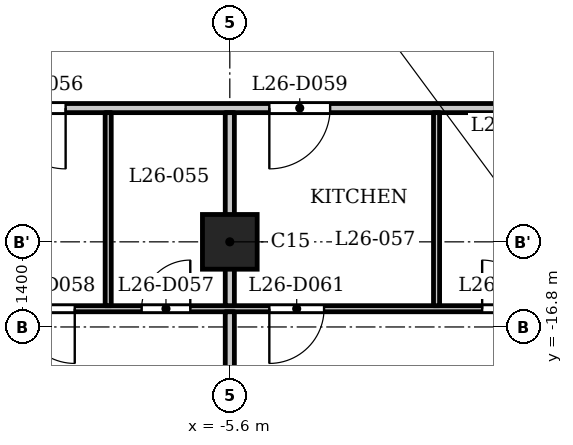
"""IFC4 building model, lengths in metres.
Left out: names, types, materials, properties, quantities, classifications, styles, units other than length and angle.
Written with IfcOpenShell. Run it as: python <this file> out.ifc"""

import sys

from ifc_helpers import new_model, si_unit, direction, frame, frame_2d, origin, origin_2d, place, context, subcontext, project, spatial, rectangle, extrude, element, fill, save


model = new_model("IFC4")
c1 = context("Model", 3, precision=1e-05, world=origin(), true_north=direction((0.0, 1.0)))
c2 = subcontext(c1, "Body", "Model", "MODEL_VIEW")
j1 = project(units=[si_unit("LENGTHUNIT", "METRE"), si_unit("PLANEANGLEUNIT", "RADIAN")], contexts=[c1])
p1 = place(None, origin())
s1 = spatial("IfcSite", under=j1, at=p1, CompositionType="ELEMENT")
p2 = place(p1, origin())
s2 = spatial("IfcBuilding", under=s1, at=p2, CompositionType="ELEMENT")
p3 = place(p2, frame((0.0, 0.0, 104.3)))
s3 = spatial("IfcBuildingStorey", under=s2, at=p3, CompositionType="ELEMENT", Elevation=104.3)
p4 = place(p3, frame((-5.6, -15.4, 0.0), z_axis=(0.0, 0.0, 1.0), x_axis=(1.0, 0.0, 0.0)))
e1 = element("IfcColumn", 1, at=p4, inside=s3, PredefinedType="COLUMN", context=c2, shape_type="SweptSolid", body=[
    extrude(rectangle(XDim=0.9, YDim=0.9, at=origin_2d()), origin(), (0.0, 0.0, 1.0), 3.5),
])
p5 = place(p3, frame((-16.725, -16.5, 0.0), z_axis=(0.0, 0.0, 1.0), x_axis=(1.0, 0.0, 0.0)))
e2 = element("IfcWall", 2, at=p5, inside=s3, PredefinedType="PARTITIONING", context=c2, shape_type="SweptSolid", body=[
    extrude(rectangle(XDim=33.45, YDim=0.1, at=frame_2d((16.725, 0.0))), origin(), (0.0, 0.0, 1.0), 3.2),
])
p6 = place(p5, frame((4.075, 0.0, 0.0)))
e3 = element("IfcOpeningElement", 3, at=p6, cuts=e2, PredefinedType="OPENING", context=c2, shape_type="SweptSolid", body=[
    extrude(rectangle(XDim=0.8, YDim=2.1, at=frame_2d((0.4, 1.05))), frame((0.0, 0.06, 0.0), z_axis=(0.0, -1.0, 0.0), x_axis=(1.0, 0.0, 0.0)), (0.0, 0.0, 1.0), 0.12),
])
p7 = place(p5, frame((1.075, 0.0, 0.0)))
e4 = element("IfcOpeningElement", 4, at=p7, cuts=e2, PredefinedType="OPENING", context=c2, shape_type="SweptSolid", body=[
    extrude(rectangle(XDim=0.9, YDim=2.1, at=frame_2d((0.45, 1.05))), frame((0.0, 0.06, 0.0), z_axis=(0.0, -1.0, 0.0), x_axis=(1.0, 0.0, 0.0)), (0.0, 0.0, 1.0), 0.12),
])
p8 = place(p5, frame((9.675, 0.0, 0.0)))
e5 = element("IfcOpeningElement", 5, at=p8, cuts=e2, PredefinedType="OPENING", context=c2, shape_type="SweptSolid", body=[
    extrude(rectangle(XDim=0.8, YDim=2.1, at=frame_2d((0.4, 1.05))), frame((0.0, 0.06, 0.0), z_axis=(0.0, -1.0, 0.0), x_axis=(1.0, 0.0, 0.0)), (0.0, 0.0, 1.0), 0.12),
])
p9 = place(p5, frame((7.675, 0.0, 0.0)))
e6 = element("IfcOpeningElement", 6, at=p9, cuts=e2, PredefinedType="OPENING", context=c2, shape_type="SweptSolid", body=[
    extrude(rectangle(XDim=0.9, YDim=2.1, at=frame_2d((0.45, 1.05))), frame((0.0, 0.06, 0.0), z_axis=(0.0, -1.0, 0.0), x_axis=(1.0, 0.0, 0.0)), (0.0, 0.0, 1.0), 0.12),
])
p10 = place(p5, frame((15.275, 0.0, 0.0)))
e7 = element("IfcOpeningElement", 7, at=p10, cuts=e2, PredefinedType="OPENING", context=c2, shape_type="SweptSolid", body=[
    extrude(rectangle(XDim=0.8, YDim=2.1, at=frame_2d((0.4, 1.05))), frame((0.0, 0.06, 0.0), z_axis=(0.0, -1.0, 0.0), x_axis=(1.0, 0.0, 0.0)), (0.0, 0.0, 1.0), 0.12),
])
p11 = place(p5, frame((11.775, 0.0, 0.0)))
e8 = element("IfcOpeningElement", 8, at=p11, cuts=e2, PredefinedType="OPENING", context=c2, shape_type="SweptSolid", body=[
    extrude(rectangle(XDim=0.9, YDim=2.1, at=frame_2d((0.45, 1.05))), frame((0.0, 0.06, 0.0), z_axis=(0.0, -1.0, 0.0), x_axis=(1.0, 0.0, 0.0)), (0.0, 0.0, 1.0), 0.12),
])
p12 = place(p5, frame((20.625, 0.0, 0.0)))
e9 = element("IfcOpeningElement", 9, at=p12, cuts=e2, PredefinedType="OPENING", context=c2, shape_type="SweptSolid", body=[
    extrude(rectangle(XDim=0.8, YDim=2.1, at=frame_2d((0.4, 1.05))), frame((0.0, 0.06, 0.0), z_axis=(0.0, -1.0, 0.0), x_axis=(1.0, 0.0, 0.0)), (0.0, 0.0, 1.0), 0.12),
])
p13 = place(p5, frame((18.375, 0.0, 0.0)))
e10 = element("IfcOpeningElement", 10, at=p13, cuts=e2, PredefinedType="OPENING", context=c2, shape_type="SweptSolid", body=[
    extrude(rectangle(XDim=0.9, YDim=2.1, at=frame_2d((0.45, 1.05))), frame((0.0, 0.06, 0.0), z_axis=(0.0, -1.0, 0.0), x_axis=(1.0, 0.0, 0.0)), (0.0, 0.0, 1.0), 0.12),
])
p14 = place(p5, frame((26.475, 0.0, 0.0)))
e11 = element("IfcOpeningElement", 11, at=p14, cuts=e2, PredefinedType="OPENING", context=c2, shape_type="SweptSolid", body=[
    extrude(rectangle(XDim=0.8, YDim=2.1, at=frame_2d((0.4, 1.05))), frame((0.0, 0.06, 0.0), z_axis=(0.0, -1.0, 0.0), x_axis=(1.0, 0.0, 0.0)), (0.0, 0.0, 1.0), 0.12),
])
p15 = place(p5, frame((23.225, 0.0, 0.0)))
e12 = element("IfcOpeningElement", 12, at=p15, cuts=e2, PredefinedType="OPENING", context=c2, shape_type="SweptSolid", body=[
    extrude(rectangle(XDim=0.9, YDim=2.1, at=frame_2d((0.45, 1.05))), frame((0.0, 0.06, 0.0), z_axis=(0.0, -1.0, 0.0), x_axis=(1.0, 0.0, 0.0)), (0.0, 0.0, 1.0), 0.12),
])
p16 = place(p5, frame((29.475, 0.0, 0.0)))
e13 = element("IfcOpeningElement", 13, at=p16, cuts=e2, PredefinedType="OPENING", context=c2, shape_type="SweptSolid", body=[
    extrude(rectangle(XDim=0.8, YDim=2.1, at=frame_2d((0.4, 1.05))), frame((0.0, 0.06, 0.0), z_axis=(0.0, -1.0, 0.0), x_axis=(1.0, 0.0, 0.0)), (0.0, 0.0, 1.0), 0.12),
])
p17 = place(p5, frame((31.825, 0.0, 0.0)))
e14 = element("IfcOpeningElement", 14, at=p17, cuts=e2, PredefinedType="OPENING", context=c2, shape_type="SweptSolid", body=[
    extrude(rectangle(XDim=0.9, YDim=2.1, at=frame_2d((0.45, 1.05))), frame((0.0, 0.06, 0.0), z_axis=(0.0, -1.0, 0.0), x_axis=(1.0, 0.0, 0.0)), (0.0, 0.0, 1.0), 0.12),
])
p18 = place(p3, frame((-17.4, -13.2, 0.0), z_axis=(0.0, 0.0, 1.0), x_axis=(1.0, 0.0, 0.0)))
e15 = element("IfcWall", 15, at=p18, inside=s3, PredefinedType="PARTITIONING", context=c2, shape_type="SweptSolid", body=[
    extrude(rectangle(XDim=34.8, YDim=0.15, at=frame_2d((17.4, 0.0))), origin(), (0.0, 0.0, 1.0), 3.2),
])
p19 = place(p18, frame((0.15, 0.0, 0.0)))
e16 = element("IfcOpeningElement", 16, at=p19, cuts=e15, PredefinedType="OPENING", context=c2, shape_type="SweptSolid", body=[
    extrude(rectangle(XDim=1.0, YDim=2.1, at=frame_2d((0.5, 1.05))), frame((0.0, 0.085, 0.0), z_axis=(0.0, -1.0, 0.0), x_axis=(1.0, 0.0, 0.0)), (0.0, 0.0, 1.0), 0.17),
])
p20 = place(p18, frame((33.55, 0.0, 0.0)))
e17 = element("IfcOpeningElement", 17, at=p20, cuts=e15, PredefinedType="OPENING", context=c2, shape_type="SweptSolid", body=[
    extrude(rectangle(XDim=1.0, YDim=2.1, at=frame_2d((0.5, 1.05))), frame((0.0, 0.085, 0.0), z_axis=(0.0, -1.0, 0.0), x_axis=(1.0, 0.0, 0.0)), (0.0, 0.0, 1.0), 0.17),
])
p21 = place(p18, frame((8.1, 0.0, 0.0)))
e18 = element("IfcOpeningElement", 18, at=p21, cuts=e15, PredefinedType="OPENING", context=c2, shape_type="SweptSolid", body=[
    extrude(rectangle(XDim=1.0, YDim=2.1, at=frame_2d((0.5, 1.05))), frame((0.0, 0.085, 0.0), z_axis=(0.0, -1.0, 0.0), x_axis=(1.0, 0.0, 0.0)), (0.0, 0.0, 1.0), 0.17),
])
p22 = place(p18, frame((12.45, 0.0, 0.0)))
e19 = element("IfcOpeningElement", 19, at=p22, cuts=e15, PredefinedType="OPENING", context=c2, shape_type="SweptSolid", body=[
    extrude(rectangle(XDim=1.0, YDim=2.1, at=frame_2d((0.5, 1.05))), frame((0.0, 0.085, 0.0), z_axis=(0.0, -1.0, 0.0), x_axis=(1.0, 0.0, 0.0)), (0.0, 0.0, 1.0), 0.17),
])
p23 = place(p18, frame((19.05, 0.0, 0.0)))
e20 = element("IfcOpeningElement", 20, at=p23, cuts=e15, PredefinedType="OPENING", context=c2, shape_type="SweptSolid", body=[
    extrude(rectangle(XDim=1.0, YDim=2.1, at=frame_2d((0.5, 1.05))), frame((0.0, 0.085, 0.0), z_axis=(0.0, -1.0, 0.0), x_axis=(1.0, 0.0, 0.0)), (0.0, 0.0, 1.0), 0.17),
])
p24 = place(p18, frame((24.9, 0.0, 0.0)))
e21 = element("IfcOpeningElement", 21, at=p24, cuts=e15, PredefinedType="OPENING", context=c2, shape_type="SweptSolid", body=[
    extrude(rectangle(XDim=1.0, YDim=2.1, at=frame_2d((0.5, 1.05))), frame((0.0, 0.085, 0.0), z_axis=(0.0, -1.0, 0.0), x_axis=(1.0, 0.0, 0.0)), (0.0, 0.0, 1.0), 0.17),
])
p25 = place(p3, frame((-7.6, -16.45, 0.0), z_axis=(0.0, 0.0, 1.0), x_axis=(0.0, 1.0, 0.0)))
e22 = element("IfcWall", 22, at=p25, inside=s3, PredefinedType="PARTITIONING", context=c2, shape_type="SweptSolid", body=[
    extrude(rectangle(XDim=3.175, YDim=0.1, at=frame_2d((1.587, 0.0))), origin(), (0.0, 0.0, 1.0), 3.2),
])
p26 = place(p3, frame((-5.6, -23.03, 0.0), z_axis=(0.0, 0.0, 1.0), x_axis=(0.0, 1.0, 0.0)))
e23 = element("IfcWall", 23, at=p26, inside=s3, PredefinedType="PARTITIONING", context=c2, shape_type="SweptSolid", body=[
    extrude(rectangle(XDim=6.48, YDim=0.15, at=frame_2d((3.24, 0.0))), origin(), (0.0, 0.0, 1.0), 3.2),
])
p27 = place(p3, frame((-5.6, -16.45, 0.0), z_axis=(0.0, 0.0, 1.0), x_axis=(0.0, 1.0, 0.0)))
e24 = element("IfcWall", 24, at=p27, inside=s3, PredefinedType="PARTITIONING", context=c2, shape_type="SweptSolid", body=[
    extrude(rectangle(XDim=3.175, YDim=0.15, at=frame_2d((1.587, 0.0))), origin(), (0.0, 0.0, 1.0), 3.2),
])
p28 = place(p3, frame((-2.2, -16.45, 0.0), z_axis=(0.0, 0.0, 1.0), x_axis=(0.0, 1.0, 0.0)))
e25 = element("IfcWall", 25, at=p28, inside=s3, PredefinedType="PARTITIONING", context=c2, shape_type="SweptSolid", body=[
    extrude(rectangle(XDim=3.175, YDim=0.1, at=frame_2d((1.587, 0.0))), origin(), (0.0, 0.0, 1.0), 3.2),
])
p29 = place(p21, origin())
e26 = element("IfcDoor", 26, at=p29, inside=s3, OperationType="SINGLE_SWING_RIGHT", PredefinedType="DOOR", context=c2, shape_type="SweptSolid", body=[
    extrude(rectangle(XDim=1.0, YDim=2.1, at=frame_2d((0.5, 1.05))), frame((0.0, 0.025, 0.0), z_axis=(0.0, -1.0, 0.0), x_axis=(1.0, 0.0, 0.0)), (0.0, 0.0, 1.0), 0.05),
])
fill(e18, e26)
p30 = place(p8, origin())
e27 = element("IfcDoor", 27, at=p30, inside=s3, OperationType="SINGLE_SWING_LEFT", PredefinedType="DOOR", context=c2, shape_type="SweptSolid", body=[
    extrude(rectangle(XDim=0.8, YDim=2.1, at=frame_2d((0.4, 1.05))), frame((0.0, 0.025, 0.0), z_axis=(0.0, -1.0, 0.0), x_axis=(1.0, 0.0, 0.0)), (0.0, 0.0, 1.0), 0.05),
])
fill(e5, e27)
p31 = place(p9, origin())
e28 = element("IfcDoor", 28, at=p31, inside=s3, OperationType="SINGLE_SWING_RIGHT", PredefinedType="DOOR", context=c2, shape_type="SweptSolid", body=[
    extrude(rectangle(XDim=0.9, YDim=2.1, at=frame_2d((0.45, 1.05))), frame((0.0, 0.025, 0.0), z_axis=(0.0, -1.0, 0.0), x_axis=(1.0, 0.0, 0.0)), (0.0, 0.0, 1.0), 0.05),
])
fill(e6, e28)
p32 = place(p22, origin())
e29 = element("IfcDoor", 29, at=p32, inside=s3, OperationType="SINGLE_SWING_LEFT", PredefinedType="DOOR", context=c2, shape_type="SweptSolid", body=[
    extrude(rectangle(XDim=1.0, YDim=2.1, at=frame_2d((0.5, 1.05))), frame((0.0, 0.025, 0.0), z_axis=(0.0, -1.0, 0.0), x_axis=(1.0, 0.0, 0.0)), (0.0, 0.0, 1.0), 0.05),
])
fill(e19, e29)
p33 = place(p10, origin())
e30 = element("IfcDoor", 30, at=p33, inside=s3, OperationType="SINGLE_SWING_RIGHT", PredefinedType="DOOR", context=c2, shape_type="SweptSolid", body=[
    extrude(rectangle(XDim=0.8, YDim=2.1, at=frame_2d((0.4, 1.05))), frame((0.0, 0.025, 0.0), z_axis=(0.0, -1.0, 0.0), x_axis=(1.0, 0.0, 0.0)), (0.0, 0.0, 1.0), 0.05),
])
fill(e7, e30)
p34 = place(p11, origin())
e31 = element("IfcDoor", 31, at=p34, inside=s3, OperationType="SINGLE_SWING_LEFT", PredefinedType="DOOR", context=c2, shape_type="SweptSolid", body=[
    extrude(rectangle(XDim=0.9, YDim=2.1, at=frame_2d((0.45, 1.05))), frame((0.0, 0.025, 0.0), z_axis=(0.0, -1.0, 0.0), x_axis=(1.0, 0.0, 0.0)), (0.0, 0.0, 1.0), 0.05),
])
fill(e8, e31)
save(model, sys.argv[1])
